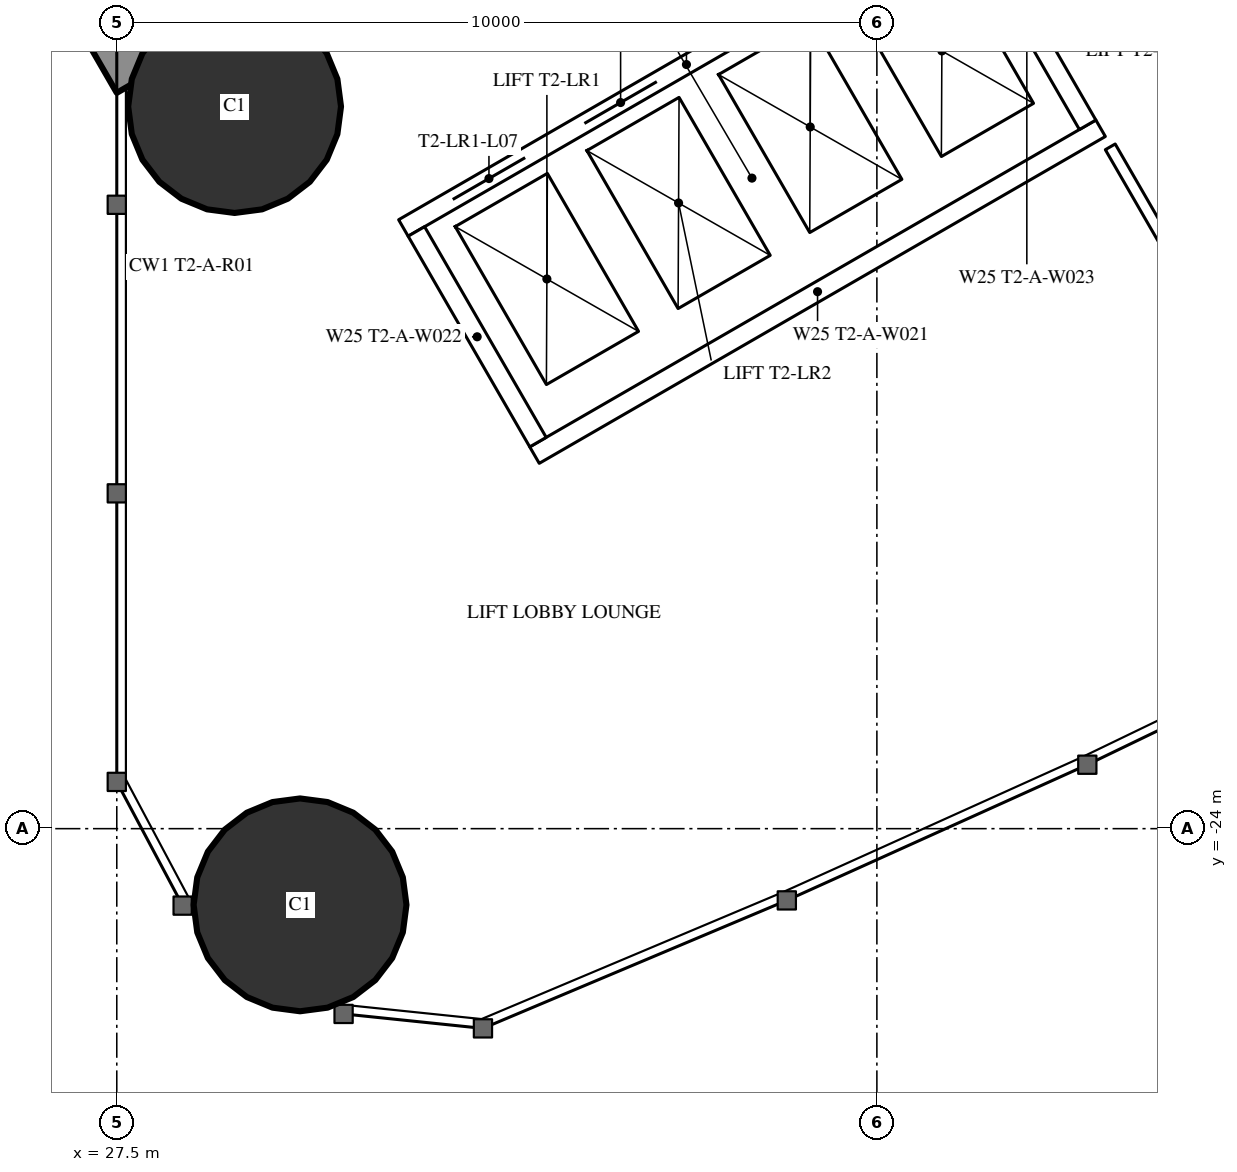
"""IFC4 building model, lengths in metres.
Left out: names, types, materials, properties, quantities, classifications, styles, units other than length and angle.
Written with IfcOpenShell. Run it as: python <this file> out.ifc"""

import sys

from ifc_helpers import new_model, si_unit, direction, frame, frame_2d, origin, origin_2d, place, context, subcontext, project, spatial, rectangle, hollow_circle, extrude, element, fill, save


model = new_model("IFC4")
c1 = context("Model", 3, precision=1e-05, world=origin(), true_north=direction((0.0, 1.0)))
c2 = subcontext(c1, "Body", "Model", "MODEL_VIEW")
j1 = project(units=[si_unit("LENGTHUNIT", "METRE"), si_unit("PLANEANGLEUNIT", "RADIAN")], contexts=[c1])
p1 = place(None, origin())
s1 = spatial("IfcSite", under=j1, at=p1, CompositionType="ELEMENT")
p2 = place(p1, origin())
s2 = spatial("IfcBuilding", under=s1, at=p2, CompositionType="ELEMENT")
p3 = place(p2, frame((0.0, 0.0, 32.0)))
s3 = spatial("IfcBuildingStorey", under=s2, at=p3, CompositionType="ELEMENT", Elevation=32.0)
for number, where, z_axis, x_axis in (
    (1, (29.911, -25.002, 0.0), (0.0, 0.0, 1.0), (1.0, 0.0, 0.0)),
    (2, (29.05, -14.5, 0.0), (0.0, 0.0, 1.0), (1.0, 0.0, 0.0)),
):
    element("IfcColumn", number, at=place(p3, frame(where, z_axis=z_axis, x_axis=x_axis)), inside=s3, PredefinedType="COLUMN", context=c2, shape_type="SweptSolid", body=[
        extrude(hollow_circle(Radius=1.4, WallThickness=0.12, at=origin_2d()), origin(), (0.0, 0.0, 1.0), 3.5),
    ])
p4 = place(p3, frame((27.2, -13.8, 0.0), z_axis=(0.0, 0.0, 1.0), x_axis=(0.866027159892, 0.499996958321, 0.0)))
e3 = element("IfcWall", 3, at=p4, inside=s3, PredefinedType="SHEAR", context=c2, shape_type="SweptSolid", body=[
    extrude(rectangle(XDim=27.947, YDim=1.2, at=frame_2d((13.973, 0.0))), origin(), (0.0, 0.0, 1.0), 3.5),
])
p5 = place(p4, frame((4.6, 0.0, 0.0)))
e4 = element("IfcOpeningElement", 4, at=p5, cuts=e3, PredefinedType="OPENING", context=c2, shape_type="SweptSolid", body=[
    extrude(rectangle(XDim=1.0, YDim=2.2, at=frame_2d((0.5, 1.1))), frame((0.0, 0.61, 0.0), z_axis=(0.0, -1.0, 0.0), x_axis=(1.0, 0.0, 0.0)), (0.0, 0.0, 1.0), 1.22),
])
p6 = place(p4, frame((13.395, 0.0, 0.0)))
e5 = element("IfcOpeningElement", 5, at=p6, cuts=e3, PredefinedType="OPENING", context=c2, shape_type="SweptSolid", body=[
    extrude(rectangle(XDim=1.8, YDim=2.2, at=frame_2d((0.9, 1.1))), frame((0.0, 0.61, 0.0), z_axis=(0.0, -1.0, 0.0), x_axis=(1.0, 0.0, 0.0)), (0.0, 0.0, 1.0), 1.22),
])
p7 = place(p3, frame((40.57, -15.03, 0.0), z_axis=(0.0, 0.0, 1.0), x_axis=(0.500012993597, -0.866017901798, 0.0)))
e6 = element("IfcWall", 6, at=p7, inside=s3, PredefinedType="PARTITIONING", context=c2, shape_type="SweptSolid", body=[
    extrude(rectangle(XDim=4.243, YDim=0.15, at=frame_2d((2.122, 0.0))), origin(), (0.0, 0.0, 1.0), 3.25),
])
p8 = place(p3, frame((31.271, -16.097, 0.0), z_axis=(0.0, 0.0, 1.0), x_axis=(0.86604045752, 0.499973925258, 0.0)))
e7 = element("IfcWall", 7, at=p8, inside=s3, PredefinedType="PARTITIONING", context=c2, shape_type="SweptSolid", body=[
    extrude(rectangle(XDim=8.6, YDim=0.25, at=frame_2d((4.3, 0.0))), origin(), (0.0, 0.0, 1.0), 3.25),
])
p9 = place(p8, frame((0.75, 0.0, 0.0)))
e8 = element("IfcOpeningElement", 8, at=p9, cuts=e7, PredefinedType="OPENING", context=c2, shape_type="SweptSolid", body=[
    extrude(rectangle(XDim=1.1, YDim=2.2, at=frame_2d((0.55, 1.1))), frame((0.0, 0.135, 0.0), z_axis=(0.0, -1.0, 0.0), x_axis=(1.0, 0.0, 0.0)), (0.0, 0.0, 1.0), 0.27),
])
p10 = place(p8, frame((2.75, 0.0, 0.0)))
e9 = element("IfcOpeningElement", 9, at=p10, cuts=e7, PredefinedType="OPENING", context=c2, shape_type="SweptSolid", body=[
    extrude(rectangle(XDim=1.1, YDim=2.2, at=frame_2d((0.55, 1.1))), frame((0.0, 0.135, 0.0), z_axis=(0.0, -1.0, 0.0), x_axis=(1.0, 0.0, 0.0)), (0.0, 0.0, 1.0), 0.27),
])
p11 = place(p8, frame((4.75, 0.0, 0.0)))
e10 = element("IfcOpeningElement", 10, at=p11, cuts=e7, PredefinedType="OPENING", context=c2, shape_type="SweptSolid", body=[
    extrude(rectangle(XDim=1.1, YDim=2.2, at=frame_2d((0.55, 1.1))), frame((0.0, 0.135, 0.0), z_axis=(0.0, -1.0, 0.0), x_axis=(1.0, 0.0, 0.0)), (0.0, 0.0, 1.0), 0.27),
])
p12 = place(p8, frame((6.75, 0.0, 0.0)))
e11 = element("IfcOpeningElement", 11, at=p12, cuts=e7, PredefinedType="OPENING", context=c2, shape_type="SweptSolid", body=[
    extrude(rectangle(XDim=1.1, YDim=2.2, at=frame_2d((0.55, 1.1))), frame((0.0, 0.135, 0.0), z_axis=(0.0, -1.0, 0.0), x_axis=(1.0, 0.0, 0.0)), (0.0, 0.0, 1.0), 0.27),
])
p13 = place(p3, frame((32.996, -19.086, 0.0), z_axis=(0.0, 0.0, 1.0), x_axis=(0.866028165386, 0.499995216735, 0.0)))
e12 = element("IfcWall", 12, at=p13, inside=s3, PredefinedType="PARTITIONING", context=c2, shape_type="SweptSolid", body=[
    extrude(rectangle(XDim=8.6, YDim=0.25, at=frame_2d((4.3, 0.0))), origin(), (0.0, 0.0, 1.0), 3.25),
])
for number, where, z_axis, x_axis in (
    (13, (31.441, -16.143, 0.0), (0.0, 0.0, 1.0), (0.5, -0.866, 0.0)),
    (14, (38.673, -11.968, 0.0), (0.0, 0.0, 1.0), (0.5, -0.866, 0.0)),
):
    element("IfcWall", number, at=place(p3, frame(where, z_axis=z_axis, x_axis=x_axis)), inside=s3, PredefinedType="PARTITIONING", context=c2, shape_type="SweptSolid", body=[
        extrude(rectangle(XDim=3.201, YDim=0.25, at=frame_2d((1.6, 0.0))), origin(), (0.0, 0.0, 1.0), 3.25),
    ])
p14 = place(p9, origin())
e15 = element("IfcDoor", 15, at=p14, inside=s3, OperationType="DOUBLE_DOOR_SLIDING", PredefinedType="USERDEFINED", context=c2, shape_type="SweptSolid", body=[
    extrude(rectangle(XDim=1.1, YDim=2.2, at=frame_2d((0.55, 1.1))), frame((0.0, 0.025, 0.0), z_axis=(0.0, -1.0, 0.0), x_axis=(1.0, 0.0, 0.0)), (0.0, 0.0, 1.0), 0.05),
])
fill(e8, e15)
p15 = place(p10, origin())
e16 = element("IfcDoor", 16, at=p15, inside=s3, OperationType="DOUBLE_DOOR_SLIDING", PredefinedType="USERDEFINED", context=c2, shape_type="SweptSolid", body=[
    extrude(rectangle(XDim=1.1, YDim=2.2, at=frame_2d((0.55, 1.1))), frame((0.0, 0.025, 0.0), z_axis=(0.0, -1.0, 0.0), x_axis=(1.0, 0.0, 0.0)), (0.0, 0.0, 1.0), 0.05),
])
fill(e9, e16)
save(model, sys.argv[1])
